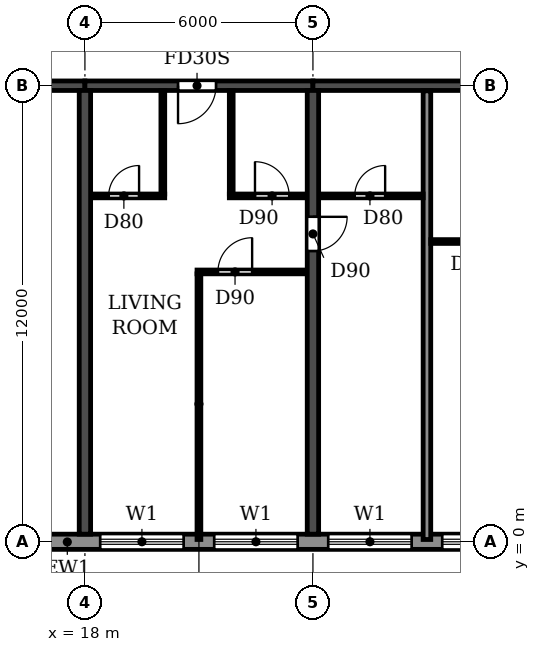
"""IFC4 building model, lengths in metres.
Left out: names, types, materials, properties, quantities, classifications, styles, units other than length and angle.
Written with IfcOpenShell. Run it as: python <this file> out.ifc"""

import sys

from ifc_helpers import new_model, si_unit, direction, frame, frame_2d, origin, place, context, subcontext, project, spatial, rectangle, extrude, element, fill, save


model = new_model("IFC4")
c1 = context("Model", 3, precision=1e-05, world=origin(), true_north=direction((0.0, 1.0)))
c2 = subcontext(c1, "Body", "Model", "MODEL_VIEW")
j1 = project(units=[si_unit("LENGTHUNIT", "METRE"), si_unit("PLANEANGLEUNIT", "RADIAN")], contexts=[c1])
p1 = place(None, origin())
s1 = spatial("IfcSite", under=j1, at=p1, CompositionType="ELEMENT")
p2 = place(p1, origin())
s2 = spatial("IfcBuilding", under=s1, at=p2, CompositionType="ELEMENT")
p3 = place(p2, frame((0.0, 0.0, 142.2)))
s3 = spatial("IfcBuildingStorey", under=s2, at=p3, CompositionType="ELEMENT", Elevation=142.2)
p4 = place(p3, frame((18.0, 0.2, 0.0), z_axis=(0.0, 0.0, 1.0), x_axis=(0.0, 1.0, 0.0)))
e1 = element("IfcWall", 1, at=p4, inside=s3, PredefinedType="SHEAR", context=c2, shape_type="SweptSolid", body=[
    extrude(rectangle(XDim=11.675, YDim=0.3, at=frame_2d((5.837, 0.0))), origin(), (0.0, 0.0, 1.0), 3.07),
])
p5 = place(p3, frame((24.0, 0.2, 0.0), z_axis=(0.0, 0.0, 1.0), x_axis=(0.0, 1.0, 0.0)))
e2 = element("IfcWall", 2, at=p5, inside=s3, PredefinedType="SHEAR", context=c2, shape_type="SweptSolid", body=[
    extrude(rectangle(XDim=11.675, YDim=0.3, at=frame_2d((5.837, 0.0))), origin(), (0.0, 0.0, 1.0), 3.07),
])
p6 = place(p5, frame((7.45, 0.0, 0.0)))
e3 = element("IfcOpeningElement", 3, at=p6, cuts=e2, PredefinedType="OPENING", context=c2, shape_type="SweptSolid", body=[
    extrude(rectangle(XDim=0.9, YDim=2.1, at=frame_2d((0.45, 1.05))), frame((0.0, 0.16, 0.0), z_axis=(0.0, -1.0, 0.0), x_axis=(1.0, 0.0, 0.0)), (0.0, 0.0, 1.0), 0.32),
])
p7 = place(p3, frame((12.2, 12.0, 0.0), z_axis=(0.0, 0.0, 1.0), x_axis=(1.0, 0.0, 0.0)))
e4 = element("IfcWall", 4, at=p7, inside=s3, PredefinedType="SHEAR", context=c2, shape_type="SweptSolid", body=[
    extrude(rectangle(XDim=5.8, YDim=0.25, at=frame_2d((2.9, 0.0))), origin(), (0.0, 0.0, 1.0), 2.47),
])
p8 = place(p7, frame((2.3, 0.0, 0.0)))
e5 = element("IfcOpeningElement", 5, at=p8, cuts=e4, PredefinedType="OPENING", context=c2, shape_type="SweptSolid", body=[
    extrude(rectangle(XDim=1.0, YDim=2.1, at=frame_2d((0.5, 1.05))), frame((0.0, 0.135, 0.0), z_axis=(0.0, -1.0, 0.0), x_axis=(1.0, 0.0, 0.0)), (0.0, 0.0, 1.0), 0.27),
])
p9 = place(p3, frame((18.0, 12.0, 0.0), z_axis=(0.0, 0.0, 1.0), x_axis=(1.0, 0.0, 0.0)))
e6 = element("IfcWall", 6, at=p9, inside=s3, PredefinedType="SHEAR", context=c2, shape_type="SweptSolid", body=[
    extrude(rectangle(XDim=6.0, YDim=0.25, at=frame_2d((3.0, 0.0))), origin(), (0.0, 0.0, 1.0), 2.47),
])
p10 = place(p9, frame((2.45, 0.0, 0.0)))
e7 = element("IfcOpeningElement", 7, at=p10, cuts=e6, PredefinedType="OPENING", context=c2, shape_type="SweptSolid", body=[
    extrude(rectangle(XDim=1.0, YDim=2.1, at=frame_2d((0.5, 1.05))), frame((0.0, 0.135, 0.0), z_axis=(0.0, -1.0, 0.0), x_axis=(1.0, 0.0, 0.0)), (0.0, 0.0, 1.0), 0.27),
])
p11 = place(p3, frame((24.0, 12.0, 0.0), z_axis=(0.0, 0.0, 1.0), x_axis=(1.0, 0.0, 0.0)))
e8 = element("IfcWall", 8, at=p11, inside=s3, PredefinedType="SHEAR", context=c2, shape_type="SweptSolid", body=[
    extrude(rectangle(XDim=6.0, YDim=0.25, at=frame_2d((3.0, 0.0))), origin(), (0.0, 0.0, 1.0), 2.47),
])
p12 = place(p3, frame((16.683, 0.0, 0.0), z_axis=(0.0, 0.0, 1.0), x_axis=(1.0, 0.0, 0.0)))
e9 = element("IfcWall", 9, at=p12, inside=s3, PredefinedType="STANDARD", context=c2, shape_type="SweptSolid", body=[
    extrude(rectangle(XDim=68.634, YDim=0.4, at=frame_2d((34.317, 0.0))), origin(), (0.0, 0.0, 1.0), 3.07),
])
p13 = place(p12, frame((1.717, 0.0, 0.9)))
e10 = element("IfcOpeningElement", 10, at=p13, cuts=e9, PredefinedType="OPENING", context=c2, shape_type="SweptSolid", body=[
    extrude(rectangle(XDim=2.2, YDim=1.5, at=frame_2d((1.1, 0.75))), frame((0.0, 0.21, 0.0), z_axis=(0.0, -1.0, 0.0), x_axis=(1.0, 0.0, 0.0)), (0.0, 0.0, 1.0), 0.42),
])
p14 = place(p12, frame((4.717, 0.0, 0.9)))
e11 = element("IfcOpeningElement", 11, at=p14, cuts=e9, PredefinedType="OPENING", context=c2, shape_type="SweptSolid", body=[
    extrude(rectangle(XDim=2.2, YDim=1.5, at=frame_2d((1.1, 0.75))), frame((0.0, 0.21, 0.0), z_axis=(0.0, -1.0, 0.0), x_axis=(1.0, 0.0, 0.0)), (0.0, 0.0, 1.0), 0.42),
])
p15 = place(p12, frame((7.717, 0.0, 0.9)))
e12 = element("IfcOpeningElement", 12, at=p15, cuts=e9, PredefinedType="OPENING", context=c2, shape_type="SweptSolid", body=[
    extrude(rectangle(XDim=2.2, YDim=1.5, at=frame_2d((1.1, 0.75))), frame((0.0, 0.21, 0.0), z_axis=(0.0, -1.0, 0.0), x_axis=(1.0, 0.0, 0.0)), (0.0, 0.0, 1.0), 0.42),
])
p16 = place(p12, frame((10.717, 0.0, 0.9)))
e13 = element("IfcOpeningElement", 13, at=p16, cuts=e9, PredefinedType="OPENING", context=c2, shape_type="SweptSolid", body=[
    extrude(rectangle(XDim=2.2, YDim=1.5, at=frame_2d((1.1, 0.75))), frame((0.0, 0.21, 0.0), z_axis=(0.0, -1.0, 0.0), x_axis=(1.0, 0.0, 0.0)), (0.0, 0.0, 1.0), 0.42),
])
p17 = place(p12, frame((13.717, 0.0, 0.9)))
e14 = element("IfcOpeningElement", 14, at=p17, cuts=e9, PredefinedType="OPENING", context=c2, shape_type="SweptSolid", body=[
    extrude(rectangle(XDim=2.2, YDim=1.5, at=frame_2d((1.1, 0.75))), frame((0.0, 0.21, 0.0), z_axis=(0.0, -1.0, 0.0), x_axis=(1.0, 0.0, 0.0)), (0.0, 0.0, 1.0), 0.42),
])
p18 = place(p12, frame((16.717, 0.0, 0.9)))
e15 = element("IfcOpeningElement", 15, at=p18, cuts=e9, PredefinedType="OPENING", context=c2, shape_type="SweptSolid", body=[
    extrude(rectangle(XDim=2.2, YDim=1.5, at=frame_2d((1.1, 0.75))), frame((0.0, 0.21, 0.0), z_axis=(0.0, -1.0, 0.0), x_axis=(1.0, 0.0, 0.0)), (0.0, 0.0, 1.0), 0.42),
])
p19 = place(p12, frame((19.717, 0.0, 0.9)))
e16 = element("IfcOpeningElement", 16, at=p19, cuts=e9, PredefinedType="OPENING", context=c2, shape_type="SweptSolid", body=[
    extrude(rectangle(XDim=2.2, YDim=1.5, at=frame_2d((1.1, 0.75))), frame((0.0, 0.21, 0.0), z_axis=(0.0, -1.0, 0.0), x_axis=(1.0, 0.0, 0.0)), (0.0, 0.0, 1.0), 0.42),
])
p20 = place(p12, frame((22.717, 0.0, 0.9)))
e17 = element("IfcOpeningElement", 17, at=p20, cuts=e9, PredefinedType="OPENING", context=c2, shape_type="SweptSolid", body=[
    extrude(rectangle(XDim=2.2, YDim=1.5, at=frame_2d((1.1, 0.75))), frame((0.0, 0.21, 0.0), z_axis=(0.0, -1.0, 0.0), x_axis=(1.0, 0.0, 0.0)), (0.0, 0.0, 1.0), 0.42),
])
p21 = place(p12, frame((25.717, 0.0, 0.9)))
e18 = element("IfcOpeningElement", 18, at=p21, cuts=e9, PredefinedType="OPENING", context=c2, shape_type="SweptSolid", body=[
    extrude(rectangle(XDim=2.2, YDim=1.5, at=frame_2d((1.1, 0.75))), frame((0.0, 0.21, 0.0), z_axis=(0.0, -1.0, 0.0), x_axis=(1.0, 0.0, 0.0)), (0.0, 0.0, 1.0), 0.42),
])
p22 = place(p12, frame((28.717, 0.0, 0.9)))
e19 = element("IfcOpeningElement", 19, at=p22, cuts=e9, PredefinedType="OPENING", context=c2, shape_type="SweptSolid", body=[
    extrude(rectangle(XDim=2.2, YDim=1.5, at=frame_2d((1.1, 0.75))), frame((0.0, 0.21, 0.0), z_axis=(0.0, -1.0, 0.0), x_axis=(1.0, 0.0, 0.0)), (0.0, 0.0, 1.0), 0.42),
])
p23 = place(p12, frame((31.717, 0.0, 0.9)))
e20 = element("IfcOpeningElement", 20, at=p23, cuts=e9, PredefinedType="OPENING", context=c2, shape_type="SweptSolid", body=[
    extrude(rectangle(XDim=2.2, YDim=1.5, at=frame_2d((1.1, 0.75))), frame((0.0, 0.21, 0.0), z_axis=(0.0, -1.0, 0.0), x_axis=(1.0, 0.0, 0.0)), (0.0, 0.0, 1.0), 0.42),
])
p24 = place(p12, frame((34.917, 0.0, 0.0)))
e21 = element("IfcOpeningElement", 21, at=p24, cuts=e9, PredefinedType="OPENING", context=c2, shape_type="SweptSolid", body=[
    extrude(rectangle(XDim=1.8, YDim=2.4, at=frame_2d((0.9, 1.2))), frame((0.0, 0.21, 0.0), z_axis=(0.0, -1.0, 0.0), x_axis=(1.0, 0.0, 0.0)), (0.0, 0.0, 1.0), 0.42),
])
p25 = place(p12, frame((37.717, 0.0, 0.9)))
e22 = element("IfcOpeningElement", 22, at=p25, cuts=e9, PredefinedType="OPENING", context=c2, shape_type="SweptSolid", body=[
    extrude(rectangle(XDim=2.2, YDim=1.5, at=frame_2d((1.1, 0.75))), frame((0.0, 0.21, 0.0), z_axis=(0.0, -1.0, 0.0), x_axis=(1.0, 0.0, 0.0)), (0.0, 0.0, 1.0), 0.42),
])
p26 = place(p12, frame((40.717, 0.0, 0.9)))
e23 = element("IfcOpeningElement", 23, at=p26, cuts=e9, PredefinedType="OPENING", context=c2, shape_type="SweptSolid", body=[
    extrude(rectangle(XDim=2.2, YDim=1.5, at=frame_2d((1.1, 0.75))), frame((0.0, 0.21, 0.0), z_axis=(0.0, -1.0, 0.0), x_axis=(1.0, 0.0, 0.0)), (0.0, 0.0, 1.0), 0.42),
])
p27 = place(p12, frame((43.717, 0.0, 0.9)))
e24 = element("IfcOpeningElement", 24, at=p27, cuts=e9, PredefinedType="OPENING", context=c2, shape_type="SweptSolid", body=[
    extrude(rectangle(XDim=2.2, YDim=1.5, at=frame_2d((1.1, 0.75))), frame((0.0, 0.21, 0.0), z_axis=(0.0, -1.0, 0.0), x_axis=(1.0, 0.0, 0.0)), (0.0, 0.0, 1.0), 0.42),
])
p28 = place(p12, frame((46.917, 0.0, 0.0)))
e25 = element("IfcOpeningElement", 25, at=p28, cuts=e9, PredefinedType="OPENING", context=c2, shape_type="SweptSolid", body=[
    extrude(rectangle(XDim=1.8, YDim=2.4, at=frame_2d((0.9, 1.2))), frame((0.0, 0.21, 0.0), z_axis=(0.0, -1.0, 0.0), x_axis=(1.0, 0.0, 0.0)), (0.0, 0.0, 1.0), 0.42),
])
p29 = place(p12, frame((49.717, 0.0, 0.9)))
e26 = element("IfcOpeningElement", 26, at=p29, cuts=e9, PredefinedType="OPENING", context=c2, shape_type="SweptSolid", body=[
    extrude(rectangle(XDim=2.2, YDim=1.5, at=frame_2d((1.1, 0.75))), frame((0.0, 0.21, 0.0), z_axis=(0.0, -1.0, 0.0), x_axis=(1.0, 0.0, 0.0)), (0.0, 0.0, 1.0), 0.42),
])
p30 = place(p12, frame((52.717, 0.0, 0.9)))
e27 = element("IfcOpeningElement", 27, at=p30, cuts=e9, PredefinedType="OPENING", context=c2, shape_type="SweptSolid", body=[
    extrude(rectangle(XDim=2.2, YDim=1.5, at=frame_2d((1.1, 0.75))), frame((0.0, 0.21, 0.0), z_axis=(0.0, -1.0, 0.0), x_axis=(1.0, 0.0, 0.0)), (0.0, 0.0, 1.0), 0.42),
])
p31 = place(p12, frame((55.717, 0.0, 0.9)))
e28 = element("IfcOpeningElement", 28, at=p31, cuts=e9, PredefinedType="OPENING", context=c2, shape_type="SweptSolid", body=[
    extrude(rectangle(XDim=2.2, YDim=1.5, at=frame_2d((1.1, 0.75))), frame((0.0, 0.21, 0.0), z_axis=(0.0, -1.0, 0.0), x_axis=(1.0, 0.0, 0.0)), (0.0, 0.0, 1.0), 0.42),
])
p32 = place(p12, frame((58.717, 0.0, 0.9)))
e29 = element("IfcOpeningElement", 29, at=p32, cuts=e9, PredefinedType="OPENING", context=c2, shape_type="SweptSolid", body=[
    extrude(rectangle(XDim=2.2, YDim=1.5, at=frame_2d((1.1, 0.75))), frame((0.0, 0.21, 0.0), z_axis=(0.0, -1.0, 0.0), x_axis=(1.0, 0.0, 0.0)), (0.0, 0.0, 1.0), 0.42),
])
p33 = place(p12, frame((61.717, 0.0, 0.9)))
e30 = element("IfcOpeningElement", 30, at=p33, cuts=e9, PredefinedType="OPENING", context=c2, shape_type="SweptSolid", body=[
    extrude(rectangle(XDim=2.2, YDim=1.5, at=frame_2d((1.1, 0.75))), frame((0.0, 0.21, 0.0), z_axis=(0.0, -1.0, 0.0), x_axis=(1.0, 0.0, 0.0)), (0.0, 0.0, 1.0), 0.42),
])
p34 = place(p12, frame((64.717, 0.0, 0.9)))
e31 = element("IfcOpeningElement", 31, at=p34, cuts=e9, PredefinedType="OPENING", context=c2, shape_type="SweptSolid", body=[
    extrude(rectangle(XDim=2.2, YDim=1.5, at=frame_2d((1.1, 0.75))), frame((0.0, 0.21, 0.0), z_axis=(0.0, -1.0, 0.0), x_axis=(1.0, 0.0, 0.0)), (0.0, 0.0, 1.0), 0.42),
])
p35 = place(p3, frame((27.0, 0.06, 0.0), z_axis=(0.0, 0.0, 1.0), x_axis=(0.0, 1.0, 0.0)))
e32 = element("IfcWall", 32, at=p35, inside=s3, PredefinedType="PARTITIONING", context=c2, shape_type="SweptSolid", body=[
    extrude(rectangle(XDim=11.805, YDim=0.2, at=frame_2d((5.902, 0.0))), origin(), (0.0, 0.0, 1.0), 3.07),
])
p36 = place(p3, frame((20.95, 7.1, 0.0), z_axis=(0.0, 0.0, 1.0), x_axis=(1.0, 0.0, 0.0)))
e33 = element("IfcWall", 33, at=p36, inside=s3, PredefinedType="PARTITIONING", context=c2, shape_type="SweptSolid", body=[
    extrude(rectangle(XDim=2.89, YDim=0.1, at=frame_2d((1.445, 0.0))), origin(), (0.0, 0.0, 1.0), 3.07),
])
p37 = place(p36, frame((0.55, 0.0, 0.0)))
e34 = element("IfcOpeningElement", 34, at=p37, cuts=e33, PredefinedType="OPENING", context=c2, shape_type="SweptSolid", body=[
    extrude(rectangle(XDim=0.9, YDim=2.1, at=frame_2d((0.45, 1.05))), frame((0.0, 0.06, 0.0), z_axis=(0.0, -1.0, 0.0), x_axis=(1.0, 0.0, 0.0)), (0.0, 0.0, 1.0), 0.12),
])
p38 = place(p3, frame((27.1, 7.9, 0.0), z_axis=(0.0, 0.0, 1.0), x_axis=(1.0, 0.0, 0.0)))
e35 = element("IfcWall", 35, at=p38, inside=s3, PredefinedType="PARTITIONING", context=c2, shape_type="SweptSolid", body=[
    extrude(rectangle(XDim=2.74, YDim=0.1, at=frame_2d((1.37, 0.0))), origin(), (0.0, 0.0, 1.0), 3.07),
])
p39 = place(p38, frame((1.0, 0.0, 0.0)))
e36 = element("IfcOpeningElement", 36, at=p39, cuts=e35, PredefinedType="OPENING", context=c2, shape_type="SweptSolid", body=[
    extrude(rectangle(XDim=0.8, YDim=2.1, at=frame_2d((0.4, 1.05))), frame((0.0, 0.06, 0.0), z_axis=(0.0, -1.0, 0.0), x_axis=(1.0, 0.0, 0.0)), (0.0, 0.0, 1.0), 0.12),
])
p40 = place(p3, frame((18.16, 9.1, 0.0), z_axis=(0.0, 0.0, 1.0), x_axis=(1.0, 0.0, 0.0)))
e37 = element("IfcWall", 37, at=p40, inside=s3, PredefinedType="PARTITIONING", context=c2, shape_type="SweptSolid", body=[
    extrude(rectangle(XDim=1.94, YDim=0.1, at=frame_2d((0.97, 0.0))), origin(), (0.0, 0.0, 1.0), 3.07),
])
p41 = place(p40, frame((0.465, 0.0, 0.0)))
e38 = element("IfcOpeningElement", 38, at=p41, cuts=e37, PredefinedType="OPENING", context=c2, shape_type="SweptSolid", body=[
    extrude(rectangle(XDim=0.8, YDim=2.1, at=frame_2d((0.4, 1.05))), frame((0.0, 0.06, 0.0), z_axis=(0.0, -1.0, 0.0), x_axis=(1.0, 0.0, 0.0)), (0.0, 0.0, 1.0), 0.12),
])
p42 = place(p3, frame((21.8, 9.1, 0.0), z_axis=(0.0, 0.0, 1.0), x_axis=(1.0, 0.0, 0.0)))
e39 = element("IfcWall", 39, at=p42, inside=s3, PredefinedType="PARTITIONING", context=c2, shape_type="SweptSolid", body=[
    extrude(rectangle(XDim=2.04, YDim=0.1, at=frame_2d((1.02, 0.0))), origin(), (0.0, 0.0, 1.0), 3.07),
])
p43 = place(p42, frame((0.675, 0.0, 0.0)))
e40 = element("IfcOpeningElement", 40, at=p43, cuts=e39, PredefinedType="OPENING", context=c2, shape_type="SweptSolid", body=[
    extrude(rectangle(XDim=0.9, YDim=2.1, at=frame_2d((0.45, 1.05))), frame((0.0, 0.06, 0.0), z_axis=(0.0, -1.0, 0.0), x_axis=(1.0, 0.0, 0.0)), (0.0, 0.0, 1.0), 0.12),
])
p44 = place(p3, frame((24.16, 9.1, 0.0), z_axis=(0.0, 0.0, 1.0), x_axis=(1.0, 0.0, 0.0)))
e41 = element("IfcWall", 41, at=p44, inside=s3, PredefinedType="PARTITIONING", context=c2, shape_type="SweptSolid", body=[
    extrude(rectangle(XDim=2.74, YDim=0.1, at=frame_2d((1.37, 0.0))), origin(), (0.0, 0.0, 1.0), 3.07),
])
p45 = place(p44, frame((0.94, 0.0, 0.0)))
e42 = element("IfcOpeningElement", 42, at=p45, cuts=e41, PredefinedType="OPENING", context=c2, shape_type="SweptSolid", body=[
    extrude(rectangle(XDim=0.8, YDim=2.1, at=frame_2d((0.4, 1.05))), frame((0.0, 0.06, 0.0), z_axis=(0.0, -1.0, 0.0), x_axis=(1.0, 0.0, 0.0)), (0.0, 0.0, 1.0), 0.12),
])
p46 = place(p3, frame((20.05, 9.15, 0.0), z_axis=(0.0, 0.0, 1.0), x_axis=(0.0, 1.0, 0.0)))
e43 = element("IfcWall", 43, at=p46, inside=s3, PredefinedType="PARTITIONING", context=c2, shape_type="SweptSolid", body=[
    extrude(rectangle(XDim=2.715, YDim=0.1, at=frame_2d((1.357, 0.0))), origin(), (0.0, 0.0, 1.0), 3.07),
])
p47 = place(p3, frame((21.0, 0.06, 0.0), z_axis=(0.0, 0.0, 1.0), x_axis=(0.0, 1.0, 0.0)))
e44 = element("IfcWall", 44, at=p47, inside=s3, PredefinedType="PARTITIONING", context=c2, shape_type="SweptSolid", body=[
    extrude(rectangle(XDim=6.99, YDim=0.1, at=frame_2d((3.495, 0.0))), origin(), (0.0, 0.0, 1.0), 3.07),
])
p48 = place(p3, frame((21.85, 9.15, 0.0), z_axis=(0.0, 0.0, 1.0), x_axis=(0.0, 1.0, 0.0)))
e45 = element("IfcWall", 45, at=p48, inside=s3, PredefinedType="PARTITIONING", context=c2, shape_type="SweptSolid", body=[
    extrude(rectangle(XDim=2.715, YDim=0.1, at=frame_2d((1.357, 0.0))), origin(), (0.0, 0.0, 1.0), 3.07),
])
p49 = place(p13, origin())
e46 = element("IfcWindow", 46, at=p49, inside=s3, PartitioningType="DOUBLE_PANEL_HORIZONTAL", PredefinedType="WINDOW", context=c2, shape_type="SweptSolid", body=[
    extrude(rectangle(XDim=2.2, YDim=1.5, at=frame_2d((1.1, 0.75))), frame((0.0, 0.03, 0.0), z_axis=(0.0, -1.0, 0.0), x_axis=(1.0, 0.0, 0.0)), (0.0, 0.0, 1.0), 0.06),
])
fill(e10, e46)
p50 = place(p14, origin())
e47 = element("IfcWindow", 47, at=p50, inside=s3, PartitioningType="DOUBLE_PANEL_HORIZONTAL", PredefinedType="WINDOW", context=c2, shape_type="SweptSolid", body=[
    extrude(rectangle(XDim=2.2, YDim=1.5, at=frame_2d((1.1, 0.75))), frame((0.0, 0.03, 0.0), z_axis=(0.0, -1.0, 0.0), x_axis=(1.0, 0.0, 0.0)), (0.0, 0.0, 1.0), 0.06),
])
fill(e11, e47)
p51 = place(p15, origin())
e48 = element("IfcWindow", 48, at=p51, inside=s3, PartitioningType="DOUBLE_PANEL_HORIZONTAL", PredefinedType="WINDOW", context=c2, shape_type="SweptSolid", body=[
    extrude(rectangle(XDim=2.2, YDim=1.5, at=frame_2d((1.1, 0.75))), frame((0.0, 0.03, 0.0), z_axis=(0.0, -1.0, 0.0), x_axis=(1.0, 0.0, 0.0)), (0.0, 0.0, 1.0), 0.06),
])
fill(e12, e48)
p52 = place(p16, origin())
e49 = element("IfcWindow", 49, at=p52, inside=s3, PartitioningType="DOUBLE_PANEL_HORIZONTAL", PredefinedType="WINDOW", context=c2, shape_type="SweptSolid", body=[
    extrude(rectangle(XDim=2.2, YDim=1.5, at=frame_2d((1.1, 0.75))), frame((0.0, 0.03, 0.0), z_axis=(0.0, -1.0, 0.0), x_axis=(1.0, 0.0, 0.0)), (0.0, 0.0, 1.0), 0.06),
])
fill(e13, e49)
p53 = place(p45, origin())
e50 = element("IfcDoor", 50, at=p53, inside=s3, OperationType="SINGLE_SWING_RIGHT", PredefinedType="DOOR", context=c2, shape_type="SweptSolid", body=[
    extrude(rectangle(XDim=0.8, YDim=2.1, at=frame_2d((0.4, 1.05))), frame((0.0, 0.025, 0.0), z_axis=(0.0, -1.0, 0.0), x_axis=(1.0, 0.0, 0.0)), (0.0, 0.0, 1.0), 0.05),
])
fill(e42, e50)
p54 = place(p41, origin())
e51 = element("IfcDoor", 51, at=p54, inside=s3, OperationType="SINGLE_SWING_RIGHT", PredefinedType="DOOR", context=c2, shape_type="SweptSolid", body=[
    extrude(rectangle(XDim=0.8, YDim=2.1, at=frame_2d((0.4, 1.05))), frame((0.0, 0.025, 0.0), z_axis=(0.0, -1.0, 0.0), x_axis=(1.0, 0.0, 0.0)), (0.0, 0.0, 1.0), 0.05),
])
fill(e38, e51)
p55 = place(p10, frame((1.0, 0.0, 0.0), z_axis=(0.0, 0.0, 1.0), x_axis=(-1.0, 0.0, 0.0)))
e52 = element("IfcDoor", 52, at=p55, inside=s3, OperationType="SINGLE_SWING_RIGHT", PredefinedType="DOOR", context=c2, shape_type="SweptSolid", body=[
    extrude(rectangle(XDim=1.0, YDim=2.1, at=frame_2d((0.5, 1.05))), frame((0.0, 0.025, 0.0), z_axis=(0.0, -1.0, 0.0), x_axis=(1.0, 0.0, 0.0)), (0.0, 0.0, 1.0), 0.05),
])
fill(e7, e52)
p56 = place(p37, origin())
e53 = element("IfcDoor", 53, at=p56, inside=s3, OperationType="SINGLE_SWING_RIGHT", PredefinedType="DOOR", context=c2, shape_type="SweptSolid", body=[
    extrude(rectangle(XDim=0.9, YDim=2.1, at=frame_2d((0.45, 1.05))), frame((0.0, 0.025, 0.0), z_axis=(0.0, -1.0, 0.0), x_axis=(1.0, 0.0, 0.0)), (0.0, 0.0, 1.0), 0.05),
])
fill(e34, e53)
p57 = place(p43, origin())
e54 = element("IfcDoor", 54, at=p57, inside=s3, OperationType="SINGLE_SWING_LEFT", PredefinedType="DOOR", context=c2, shape_type="SweptSolid", body=[
    extrude(rectangle(XDim=0.9, YDim=2.1, at=frame_2d((0.45, 1.05))), frame((0.0, 0.025, 0.0), z_axis=(0.0, -1.0, 0.0), x_axis=(1.0, 0.0, 0.0)), (0.0, 0.0, 1.0), 0.05),
])
fill(e40, e54)
p58 = place(p6, frame((0.9, 0.0, 0.0), z_axis=(0.0, 0.0, 1.0), x_axis=(-1.0, 0.0, 0.0)))
e55 = element("IfcDoor", 55, at=p58, inside=s3, OperationType="SINGLE_SWING_LEFT", PredefinedType="DOOR", context=c2, shape_type="SweptSolid", body=[
    extrude(rectangle(XDim=0.9, YDim=2.1, at=frame_2d((0.45, 1.05))), frame((0.0, 0.025, 0.0), z_axis=(0.0, -1.0, 0.0), x_axis=(1.0, 0.0, 0.0)), (0.0, 0.0, 1.0), 0.05),
])
fill(e3, e55)
save(model, sys.argv[1])
